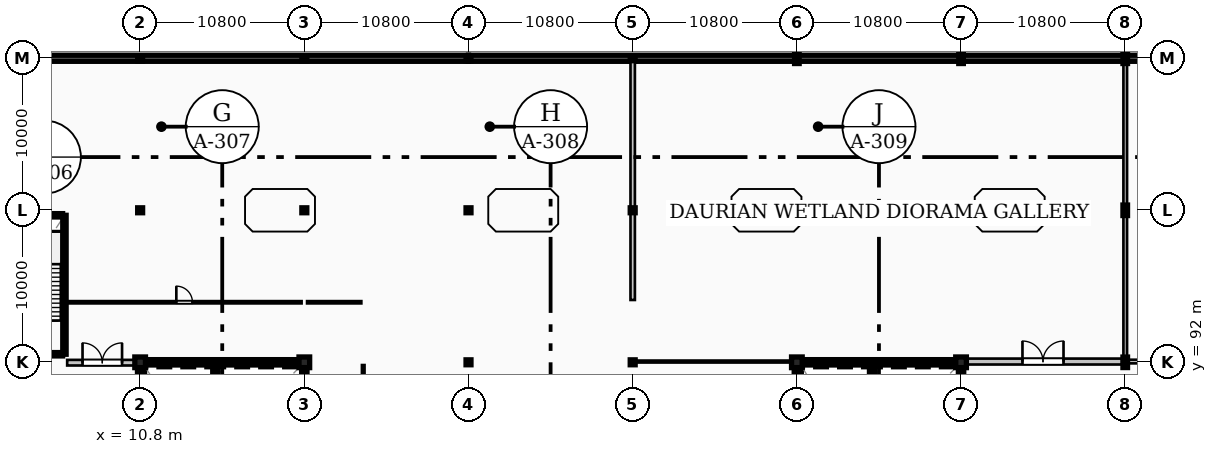
"""IFC4 building model, lengths in metres.
Left out: names, types, materials, properties, quantities, classifications, styles, units other than length and angle.
Written with IfcOpenShell. Run it as: python <this file> out.ifc"""

import sys

from ifc_helpers import new_model, si_unit, direction, frame, frame_2d, origin, origin_2d, place, context, subcontext, project, spatial, rectangle, hollow_circle, i_section, extrude, element, fill, save


model = new_model("IFC4")
c1 = context("Model", 3, precision=1e-05, world=origin(), true_north=direction((0.0, 1.0)))
c2 = subcontext(c1, "Body", "Model", "MODEL_VIEW")
j1 = project(units=[si_unit("LENGTHUNIT", "METRE"), si_unit("PLANEANGLEUNIT", "RADIAN")], contexts=[c1])
p1 = place(None, origin())
s1 = spatial("IfcSite", under=j1, at=p1, CompositionType="ELEMENT")
p2 = place(p1, origin())
s2 = spatial("IfcBuilding", under=s1, at=p2, CompositionType="ELEMENT")
p3 = place(p2, frame((0.0, 0.0, 4.8)))
s3 = spatial("IfcBuildingStorey", under=s2, at=p3, CompositionType="ELEMENT", Elevation=4.8)
p4 = place(p3, frame((-0.22, 112.0, 0.0), z_axis=(0.0, 0.0, 1.0), x_axis=(1.0, 0.0, 0.0)))
e1 = element("IfcWall", 1, at=p4, inside=s3, PredefinedType="USERDEFINED", context=c2, shape_type="SweptSolid", body=[
    extrude(rectangle(XDim=32.62, YDim=0.4, at=frame_2d((16.31, 0.0))), origin(), (0.0, 0.0, 1.0), 4.56),
])
p5 = place(p3, frame((32.4, 112.0, 0.0), z_axis=(0.0, 0.0, 1.0), x_axis=(1.0, 0.0, 0.0)))
e2 = element("IfcWall", 2, at=p5, inside=s3, PredefinedType="USERDEFINED", context=c2, shape_type="SweptSolid", body=[
    extrude(rectangle(XDim=32.4, YDim=0.4, at=frame_2d((16.2, 0.0))), origin(), (0.0, 0.0, 1.0), 4.56),
])
p6 = place(p3, frame((64.8, 112.0, 0.0), z_axis=(0.0, 0.0, 1.0), x_axis=(1.0, 0.0, 0.0)))
e3 = element("IfcWall", 3, at=p6, inside=s3, PredefinedType="USERDEFINED", context=c2, shape_type="SweptSolid", body=[
    extrude(rectangle(XDim=43.42, YDim=0.4, at=frame_2d((21.71, 0.0))), origin(), (0.0, 0.0, 1.0), 4.56),
])
p7 = place(p3, frame((10.8, 92.0, 0.0), z_axis=(0.0, 0.0, 1.0), x_axis=(1.0, 0.0, 0.0)))
e4 = element("IfcColumn", 4, at=p7, inside=s3, PredefinedType="COLUMN", context=c2, shape_type="SweptSolid", body=[
    extrude(rectangle(XDim=0.7, YDim=0.7, at=origin_2d()), origin(), (0.0, 0.0, 1.0), 4.8),
])
for number, where, z_axis, x_axis in (
    (5, (10.8, 102.0, 0.0), (0.0, 0.0, 1.0), (1.0, 0.0, 0.0)),
    (6, (10.8, 112.0, 0.0), (0.0, 0.0, 1.0), (1.0, 0.0, 0.0)),
):
    element("IfcColumn", number, at=place(p3, frame(where, z_axis=z_axis, x_axis=x_axis)), inside=s3, PredefinedType="COLUMN", context=c2, shape_type="SweptSolid", body=[
        extrude(hollow_circle(Radius=0.162, WallThickness=0.014, at=origin_2d()), origin(), (0.0, 0.0, 1.0), 4.8),
    ])
p8 = place(p3, frame((21.6, 92.0, 0.0), z_axis=(0.0, 0.0, 1.0), x_axis=(1.0, 0.0, 0.0)))
e7 = element("IfcColumn", 7, at=p8, inside=s3, PredefinedType="COLUMN", context=c2, shape_type="SweptSolid", body=[
    extrude(rectangle(XDim=0.7, YDim=0.7, at=origin_2d()), origin(), (0.0, 0.0, 1.0), 4.8),
])
for number, where, z_axis, x_axis in (
    (8, (21.6, 102.0, 0.0), (0.0, 0.0, 1.0), (1.0, 0.0, 0.0)),
    (9, (21.6, 112.0, 0.0), (0.0, 0.0, 1.0), (1.0, 0.0, 0.0)),
    (10, (32.4, 92.0, 0.0), (0.0, 0.0, 1.0), (1.0, 0.0, 0.0)),
    (11, (32.4, 102.0, 0.0), (0.0, 0.0, 1.0), (1.0, 0.0, 0.0)),
    (12, (32.4, 112.0, 0.0), (0.0, 0.0, 1.0), (1.0, 0.0, 0.0)),
    (13, (43.2, 92.0, 0.0), (0.0, 0.0, 1.0), (1.0, 0.0, 0.0)),
    (14, (43.2, 102.0, 0.0), (0.0, 0.0, 1.0), (1.0, 0.0, 0.0)),
    (15, (43.2, 112.0, 0.0), (0.0, 0.0, 1.0), (1.0, 0.0, 0.0)),
):
    element("IfcColumn", number, at=place(p3, frame(where, z_axis=z_axis, x_axis=x_axis)), inside=s3, PredefinedType="COLUMN", context=c2, shape_type="SweptSolid", body=[
        extrude(hollow_circle(Radius=0.162, WallThickness=0.014, at=origin_2d()), origin(), (0.0, 0.0, 1.0), 4.8),
    ])
p9 = place(p3, frame((54.0, 92.0, 0.0), z_axis=(0.0, 0.0, 1.0), x_axis=(1.0, 0.0, 0.0)))
e16 = element("IfcColumn", 16, at=p9, inside=s3, PredefinedType="COLUMN", context=c2, shape_type="SweptSolid", body=[
    extrude(rectangle(XDim=0.7, YDim=0.7, at=origin_2d()), origin(), (0.0, 0.0, 1.0), 4.8),
])
for number, where, z_axis, x_axis in (
    (17, (54.0, 102.0, 0.0), (0.0, 0.0, 1.0), (1.0, 0.0, 0.0)),
    (18, (54.0, 112.0, 0.0), (0.0, 0.0, 1.0), (1.0, 0.0, 0.0)),
):
    element("IfcColumn", number, at=place(p3, frame(where, z_axis=z_axis, x_axis=x_axis)), inside=s3, PredefinedType="COLUMN", context=c2, shape_type="SweptSolid", body=[
        extrude(i_section(OverallWidth=0.3, OverallDepth=0.69, WebThickness=0.014, FlangeThickness=0.027, FilletRadius=0.027, at=origin_2d()), origin(), (0.0, 0.0, 1.0), 4.8),
    ])
p10 = place(p3, frame((64.8, 92.0, 0.0), z_axis=(0.0, 0.0, 1.0), x_axis=(1.0, 0.0, 0.0)))
e19 = element("IfcColumn", 19, at=p10, inside=s3, PredefinedType="COLUMN", context=c2, shape_type="SweptSolid", body=[
    extrude(rectangle(XDim=0.7, YDim=0.7, at=origin_2d()), origin(), (0.0, 0.0, 1.0), 4.8),
])
for number, where, z_axis, x_axis in (
    (20, (64.8, 102.0, 0.0), (0.0, 0.0, 1.0), (1.0, 0.0, 0.0)),
    (21, (64.8, 112.0, 0.0), (0.0, 0.0, 1.0), (1.0, 0.0, 0.0)),
    (22, (75.6, 92.0, 0.0), (0.0, 0.0, 1.0), (1.0, 0.0, 0.0)),
    (23, (75.6, 102.0, 0.0), (0.0, 0.0, 1.0), (1.0, 0.0, 0.0)),
    (24, (75.6, 112.0, 0.0), (0.0, 0.0, 1.0), (1.0, 0.0, 0.0)),
):
    element("IfcColumn", number, at=place(p3, frame(where, z_axis=z_axis, x_axis=x_axis)), inside=s3, PredefinedType="COLUMN", context=c2, shape_type="SweptSolid", body=[
        extrude(i_section(OverallWidth=0.3, OverallDepth=0.69, WebThickness=0.014, FlangeThickness=0.027, FilletRadius=0.027, at=origin_2d()), origin(), (0.0, 0.0, 1.0), 4.8),
    ])
p11 = place(p3, frame((11.15, 92.0, 0.0), z_axis=(0.0, 0.0, 1.0), x_axis=(1.0, 0.0, 0.0)))
e25 = element("IfcWall", 25, at=p11, inside=s3, PredefinedType="SHEAR", context=c2, shape_type="SweptSolid", body=[
    extrude(rectangle(XDim=10.1, YDim=0.35, at=frame_2d((5.05, 0.0))), origin(), (0.0, 0.0, 1.0), 4.56),
])
p12 = place(p3, frame((10.8, 82.35, 0.0), z_axis=(0.0, 0.0, 1.0), x_axis=(0.0, 1.0, 0.0)))
e26 = element("IfcWall", 26, at=p12, inside=s3, PredefinedType="SHEAR", context=c2, shape_type="SweptSolid", body=[
    extrude(rectangle(XDim=9.3, YDim=0.35, at=frame_2d((4.65, 0.0))), origin(), (0.0, 0.0, 1.0), 4.56),
])
p13 = place(p3, frame((21.6, 82.35, 0.0), z_axis=(0.0, 0.0, 1.0), x_axis=(0.0, 1.0, 0.0)))
e27 = element("IfcWall", 27, at=p13, inside=s3, PredefinedType="SHEAR", context=c2, shape_type="SweptSolid", body=[
    extrude(rectangle(XDim=9.3, YDim=0.35, at=frame_2d((4.65, 0.0))), origin(), (0.0, 0.0, 1.0), 4.56),
])
p14 = place(p13, frame((0.83, 0.0, 0.0)))
e28 = element("IfcOpeningElement", 28, at=p14, cuts=e27, PredefinedType="OPENING", context=c2, shape_type="SweptSolid", body=[
    extrude(rectangle(XDim=1.8, YDim=2.25, at=frame_2d((0.9, 1.125))), frame((0.0, 0.185, 0.0), z_axis=(0.0, -1.0, 0.0), x_axis=(1.0, 0.0, 0.0)), (0.0, 0.0, 1.0), 0.37),
])
p15 = place(p3, frame((15.75, 82.175, 0.0), z_axis=(0.0, 0.0, 1.0), x_axis=(0.0, 1.0, 0.0)))
e29 = element("IfcWall", 29, at=p15, inside=s3, PredefinedType="SHEAR", context=c2, shape_type="SweptSolid", body=[
    extrude(rectangle(XDim=9.65, YDim=0.35, at=frame_2d((4.825, 0.0))), origin(), (0.0, 0.0, 1.0), 4.56),
])
p16 = place(p15, frame((0.9, 0.0, 0.0)))
e30 = element("IfcOpeningElement", 30, at=p16, cuts=e29, PredefinedType="OPENING", context=c2, shape_type="SweptSolid", body=[
    extrude(rectangle(XDim=1.1, YDim=2.2, at=frame_2d((0.55, 1.1))), frame((0.0, 0.185, 0.0), z_axis=(0.0, -1.0, 0.0), x_axis=(1.0, 0.0, 0.0)), (0.0, 0.0, 1.0), 0.37),
])
p17 = place(p3, frame((54.35, 92.0, 0.0), z_axis=(0.0, 0.0, 1.0), x_axis=(1.0, 0.0, 0.0)))
e31 = element("IfcWall", 31, at=p17, inside=s3, PredefinedType="SHEAR", context=c2, shape_type="SweptSolid", body=[
    extrude(rectangle(XDim=10.1, YDim=0.35, at=frame_2d((5.05, 0.0))), origin(), (0.0, 0.0, 1.0), 4.56),
])
p18 = place(p3, frame((54.0, 82.35, 0.0), z_axis=(0.0, 0.0, 1.0), x_axis=(0.0, 1.0, 0.0)))
e32 = element("IfcWall", 32, at=p18, inside=s3, PredefinedType="SHEAR", context=c2, shape_type="SweptSolid", body=[
    extrude(rectangle(XDim=9.3, YDim=0.35, at=frame_2d((4.65, 0.0))), origin(), (0.0, 0.0, 1.0), 4.56),
])
p19 = place(p3, frame((64.8, 82.35, 0.0), z_axis=(0.0, 0.0, 1.0), x_axis=(0.0, 1.0, 0.0)))
e33 = element("IfcWall", 33, at=p19, inside=s3, PredefinedType="SHEAR", context=c2, shape_type="SweptSolid", body=[
    extrude(rectangle(XDim=9.3, YDim=0.35, at=frame_2d((4.65, 0.0))), origin(), (0.0, 0.0, 1.0), 4.56),
])
p20 = place(p19, frame((0.83, 0.0, 0.0)))
e34 = element("IfcOpeningElement", 34, at=p20, cuts=e33, PredefinedType="OPENING", context=c2, shape_type="SweptSolid", body=[
    extrude(rectangle(XDim=1.8, YDim=2.25, at=frame_2d((0.9, 1.125))), frame((0.0, 0.185, 0.0), z_axis=(0.0, -1.0, 0.0), x_axis=(1.0, 0.0, 0.0)), (0.0, 0.0, 1.0), 0.37),
])
p21 = place(p3, frame((58.95, 82.175, 0.0), z_axis=(0.0, 0.0, 1.0), x_axis=(0.0, 1.0, 0.0)))
e35 = element("IfcWall", 35, at=p21, inside=s3, PredefinedType="SHEAR", context=c2, shape_type="SweptSolid", body=[
    extrude(rectangle(XDim=9.65, YDim=0.35, at=frame_2d((4.825, 0.0))), origin(), (0.0, 0.0, 1.0), 4.56),
])
p22 = place(p21, frame((0.9, 0.0, 0.0)))
e36 = element("IfcOpeningElement", 36, at=p22, cuts=e35, PredefinedType="OPENING", context=c2, shape_type="SweptSolid", body=[
    extrude(rectangle(XDim=1.1, YDim=2.2, at=frame_2d((0.55, 1.1))), frame((0.0, 0.185, 0.0), z_axis=(0.0, -1.0, 0.0), x_axis=(1.0, 0.0, 0.0)), (0.0, 0.0, 1.0), 0.37),
])
p23 = place(p3, frame((5.82, 92.53, 0.0), z_axis=(0.0, 0.0, 1.0), x_axis=(0.0, 1.0, 0.0)))
e37 = element("IfcWall", 37, at=p23, inside=s3, PredefinedType="SHEAR", context=c2, shape_type="SweptSolid", body=[
    extrude(rectangle(XDim=9.14, YDim=0.22, at=frame_2d((4.57, 0.0))), origin(), (0.0, 0.0, 1.0), 4.56),
])
p24 = place(p3, frame((1.3, 101.67, 0.0), z_axis=(0.0, 0.0, 1.0), x_axis=(1.0, 0.0, 0.0)))
e38 = element("IfcWall", 38, at=p24, inside=s3, PredefinedType="SHEAR", context=c2, shape_type="SweptSolid", body=[
    extrude(rectangle(XDim=4.4, YDim=0.22, at=frame_2d((2.2, 0.0))), origin(), (0.0, 0.0, 1.0), 4.56),
])
p25 = place(p3, frame((1.3, 92.53, 0.0), z_axis=(0.0, 0.0, 1.0), x_axis=(1.0, 0.0, 0.0)))
e39 = element("IfcWall", 39, at=p25, inside=s3, PredefinedType="SHEAR", context=c2, shape_type="SweptSolid", body=[
    extrude(rectangle(XDim=4.4, YDim=0.22, at=frame_2d((2.2, 0.0))), origin(), (0.0, 0.0, 1.0), 4.56),
])
p26 = place(p25, frame((1.65, 0.0, 0.0)))
e40 = element("IfcOpeningElement", 40, at=p26, cuts=e39, PredefinedType="OPENING", context=c2, shape_type="SweptSolid", body=[
    extrude(rectangle(XDim=1.1, YDim=2.2, at=frame_2d((0.55, 1.1))), frame((0.0, 0.12, 0.0), z_axis=(0.0, -1.0, 0.0), x_axis=(1.0, 0.0, 0.0)), (0.0, 0.0, 1.0), 0.24),
])
p27 = place(p3, frame((6.0, 91.975, 0.0), z_axis=(0.0, 0.0, 1.0), x_axis=(1.0, 0.0, 0.0)))
e41 = element("IfcWall", 41, at=p27, inside=s3, PredefinedType="PARTITIONING", context=c2, shape_type="SweptSolid", body=[
    extrude(rectangle(XDim=4.62, YDim=0.37, at=frame_2d((2.31, 0.0))), origin(), (0.0, 0.0, 1.0), 4.069),
])
p28 = place(p27, frame((1.01, 0.0, 0.0)))
e42 = element("IfcOpeningElement", 42, at=p28, cuts=e41, PredefinedType="OPENING", context=c2, shape_type="SweptSolid", body=[
    extrude(rectangle(XDim=2.6, YDim=2.8, at=frame_2d((1.3, 1.4))), frame((0.0, 0.195, 0.0), z_axis=(0.0, -1.0, 0.0), x_axis=(1.0, 0.0, 0.0)), (0.0, 0.0, 1.0), 0.39),
])
p29 = place(p3, frame((64.98, 92.05, 0.0), z_axis=(0.0, 0.0, 1.0), x_axis=(1.0, 0.0, 0.0)))
e43 = element("IfcWall", 43, at=p29, inside=s3, PredefinedType="PARTITIONING", context=c2, shape_type="SweptSolid", body=[
    extrude(rectangle(XDim=10.42, YDim=0.39, at=frame_2d((5.21, 0.0))), origin(), (0.0, 0.0, 1.0), 4.069),
])
p30 = place(p29, frame((3.86, 0.0, 0.0)))
e44 = element("IfcOpeningElement", 44, at=p30, cuts=e43, PredefinedType="OPENING", context=c2, shape_type="SweptSolid", body=[
    extrude(rectangle(XDim=2.7, YDim=2.85, at=frame_2d((1.35, 1.425))), frame((0.0, 0.205, 0.0), z_axis=(0.0, -1.0, 0.0), x_axis=(1.0, 0.0, 0.0)), (0.0, 0.0, 1.0), 0.41),
])
p31 = place(p3, frame((75.8, 92.05, 0.0), z_axis=(0.0, 0.0, 1.0), x_axis=(1.0, 0.0, 0.0)))
e45 = element("IfcWall", 45, at=p31, inside=s3, PredefinedType="SOLIDWALL", context=c2, shape_type="SweptSolid", body=[
    extrude(rectangle(XDim=10.4, YDim=0.24, at=frame_2d((5.2, 0.0))), origin(), (0.0, 0.0, 1.0), 4.069),
])
p32 = place(p3, frame((6.0, 95.95, 0.0), z_axis=(0.0, 0.0, 1.0), x_axis=(1.0, 0.0, 0.0)))
e46 = element("IfcWall", 46, at=p32, inside=s3, PredefinedType="PARTITIONING", context=c2, shape_type="SweptSolid", body=[
    extrude(rectangle(XDim=15.42, YDim=0.15, at=frame_2d((7.71, 0.0))), origin(), (0.0, 0.0, 1.0), 4.52),
])
p33 = place(p32, frame((7.18, 0.0, 0.0)))
e47 = element("IfcOpeningElement", 47, at=p33, cuts=e46, PredefinedType="OPENING", context=c2, shape_type="SweptSolid", body=[
    extrude(rectangle(XDim=1.06, YDim=2.22, at=frame_2d((0.53, 1.11))), frame((0.0, 0.085, 0.0), z_axis=(0.0, -1.0, 0.0), x_axis=(1.0, 0.0, 0.0)), (0.0, 0.0, 1.0), 0.17),
])
p34 = place(p3, frame((25.475, 86.3, 0.0), z_axis=(0.0, 0.0, 1.0), x_axis=(0.0, 1.0, 0.0)))
e48 = element("IfcWall", 48, at=p34, inside=s3, PredefinedType="PARTITIONING", context=c2, shape_type="SweptSolid", body=[
    extrude(rectangle(XDim=5.52, YDim=0.17, at=frame_2d((2.76, 0.0))), origin(), (0.0, 0.0, 1.0), 4.52),
])
p35 = place(p34, frame((2.17, 0.0, 0.0)))
e49 = element("IfcOpeningElement", 49, at=p35, cuts=e48, PredefinedType="OPENING", context=c2, shape_type="SweptSolid", body=[
    extrude(rectangle(XDim=1.18, YDim=2.28, at=frame_2d((0.59, 1.14))), frame((0.0, 0.095, 0.0), z_axis=(0.0, -1.0, 0.0), x_axis=(1.0, 0.0, 0.0)), (0.0, 0.0, 1.0), 0.19),
])
p36 = place(p3, frame((43.38, 92.05, 0.0), z_axis=(0.0, 0.0, 1.0), x_axis=(1.0, 0.0, 0.0)))
e50 = element("IfcWall", 50, at=p36, inside=s3, PredefinedType="PARTITIONING", context=c2, shape_type="SweptSolid", body=[
    extrude(rectangle(XDim=10.44, YDim=0.13, at=frame_2d((5.22, 0.0))), origin(), (0.0, 0.0, 1.0), 4.069),
])
p37 = place(p3, frame((21.78, 95.95, 0.0), z_axis=(0.0, 0.0, 1.0), x_axis=(1.0, 0.0, 0.0)))
e51 = element("IfcWall", 51, at=p37, inside=s3, PredefinedType="PARTITIONING", context=c2, shape_type="SweptSolid", body=[
    extrude(rectangle(XDim=3.57, YDim=0.15, at=frame_2d((1.785, 0.0))), origin(), (0.0, 0.0, 1.0), 4.52),
])
p38 = place(p3, frame((43.2, 96.1, 0.0), z_axis=(0.0, 0.0, 1.0), x_axis=(0.0, 1.0, 0.0)))
e52 = element("IfcWall", 52, at=p38, inside=s3, PredefinedType="PARTITIONING", context=c2, shape_type="SweptSolid", body=[
    extrude(rectangle(XDim=5.7, YDim=0.29, at=frame_2d((2.85, 0.0))), origin(), (0.0, 0.0, 1.0), 4.06),
])
p39 = place(p3, frame((43.2, 102.2, 0.0), z_axis=(0.0, 0.0, 1.0), x_axis=(0.0, 1.0, 0.0)))
e53 = element("IfcWall", 53, at=p39, inside=s3, PredefinedType="PARTITIONING", context=c2, shape_type="SweptSolid", body=[
    extrude(rectangle(XDim=9.62, YDim=0.29, at=frame_2d((4.81, 0.0))), origin(), (0.0, 0.0, 1.0), 4.06),
])
for number, where, z_axis, x_axis in (
    (54, (75.6, 92.18, 0.0), (0.0, 0.0, 1.0), (0.0, 1.0, 0.0)),
    (55, (75.6, 102.2, 0.0), (0.0, 0.0, 1.0), (0.0, 1.0, 0.0)),
):
    element("IfcWall", number, at=place(p3, frame(where, z_axis=z_axis, x_axis=x_axis)), inside=s3, PredefinedType="SOLIDWALL", context=c2, shape_type="SweptSolid", body=[
        extrude(rectangle(XDim=9.62, YDim=0.24, at=frame_2d((4.81, 0.0))), origin(), (0.0, 0.0, 1.0), 4.06),
    ])
p40 = place(p28, origin())
e56 = element("IfcDoor", 56, at=p40, inside=s3, OperationType="DOUBLE_DOOR_SINGLE_SWING", PredefinedType="DOOR", context=c2, shape_type="SweptSolid", body=[
    extrude(rectangle(XDim=2.6, YDim=2.8, at=frame_2d((1.3, 1.4))), frame((0.0, 0.025, 0.0), z_axis=(0.0, -1.0, 0.0), x_axis=(1.0, 0.0, 0.0)), (0.0, 0.0, 1.0), 0.05),
])
fill(e42, e56)
p41 = place(p30, origin())
e57 = element("IfcDoor", 57, at=p41, inside=s3, OperationType="DOUBLE_DOOR_SINGLE_SWING", PredefinedType="DOOR", context=c2, shape_type="SweptSolid", body=[
    extrude(rectangle(XDim=2.7, YDim=2.85, at=frame_2d((1.35, 1.425))), frame((0.0, 0.025, 0.0), z_axis=(0.0, -1.0, 0.0), x_axis=(1.0, 0.0, 0.0)), (0.0, 0.0, 1.0), 0.05),
])
fill(e44, e57)
p42 = place(p33, origin())
e58 = element("IfcDoor", 58, at=p42, inside=s3, OperationType="SINGLE_SWING_LEFT", PredefinedType="DOOR", context=c2, shape_type="SweptSolid", body=[
    extrude(rectangle(XDim=1.06, YDim=2.22, at=frame_2d((0.53, 1.11))), frame((0.0, 0.025, 0.0), z_axis=(0.0, -1.0, 0.0), x_axis=(1.0, 0.0, 0.0)), (0.0, 0.0, 1.0), 0.05),
])
fill(e47, e58)
save(model, sys.argv[1])
